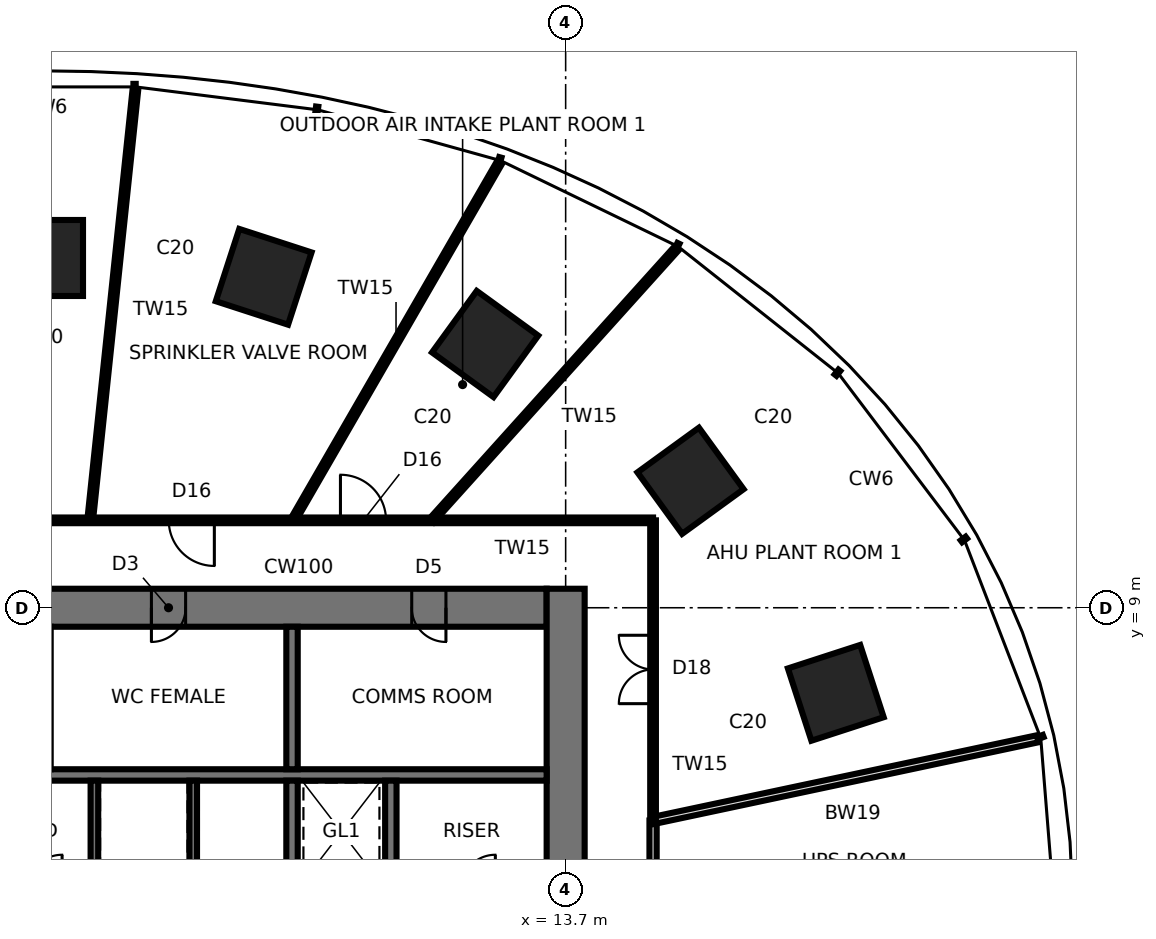
"""IFC4 building model, lengths in metres.
Left out: names, types, materials, properties, quantities, classifications, styles, units other than length and angle.
Written with IfcOpenShell. Run it as: python <this file> out.ifc"""

import sys

from ifc_helpers import new_model, si_unit, direction, frame, frame_2d, origin, origin_2d, place, context, subcontext, project, spatial, rectangle, extrude, element, fill, save


model = new_model("IFC4")
c1 = context("Model", 3, precision=1e-05, world=origin(), true_north=direction((0.0, 1.0)))
c2 = subcontext(c1, "Body", "Model", "MODEL_VIEW")
j1 = project(units=[si_unit("LENGTHUNIT", "METRE"), si_unit("PLANEANGLEUNIT", "RADIAN")], contexts=[c1])
p1 = place(None, origin())
s1 = spatial("IfcSite", under=j1, at=p1, CompositionType="ELEMENT")
p2 = place(p1, origin())
s2 = spatial("IfcBuilding", under=s1, at=p2, CompositionType="ELEMENT")
p3 = place(p2, frame((0.0, 0.0, 86.8)))
s3 = spatial("IfcBuildingStorey", under=s2, at=p3, CompositionType="ELEMENT", Elevation=86.8)
for number, where, z_axis, x_axis in (
    (1, (20.808, 6.761, 0.0), (0.0, 0.0, 1.0), (0.951, 0.309, 0.0)),
    (2, (16.986, 12.341, 0.0), (0.0, 0.0, 1.0), (0.809, 0.588, 0.0)),
    (3, (11.581, 15.94, 0.0), (0.0, 0.0, 1.0), (0.588, 0.809, 0.0)),
    (4, (5.754, 17.708, 0.0), (0.0, 0.0, 1.0), (0.309, 0.951, 0.0)),
    (5, (0.0, 18.204, 0.0), (0.0, 0.0, 1.0), (0.0, 1.0, 0.0)),
):
    element("IfcColumn", number, at=place(p3, frame(where, z_axis=z_axis, x_axis=x_axis)), inside=s3, PredefinedType="COLUMN", context=c2, shape_type="SweptSolid", body=[
        extrude(rectangle(XDim=2.0, YDim=2.0, at=origin_2d()), origin(), (0.0, 0.0, 1.0), 5.6),
    ])
p4 = place(p3, frame((13.2, 9.0, 0.0), z_axis=(0.0, 0.0, 1.0), x_axis=(-1.0, 0.0, 0.0)))
e6 = element("IfcWall", 6, at=p4, inside=s3, PredefinedType="SHEAR", context=c2, shape_type="SweptSolid", body=[
    extrude(rectangle(XDim=26.4, YDim=1.0, at=frame_2d((13.2, 0.0))), origin(), (0.0, 0.0, 1.0), 5.6),
])
p5 = place(p4, frame((2.65, 0.0, 0.0)))
e7 = element("IfcOpeningElement", 7, at=p5, cuts=e6, PredefinedType="OPENING", context=c2, shape_type="SweptSolid", body=[
    extrude(rectangle(XDim=0.9, YDim=2.1, at=frame_2d((0.45, 1.05))), frame((0.0, 0.51, 0.0), z_axis=(0.0, -1.0, 0.0), x_axis=(1.0, 0.0, 0.0)), (0.0, 0.0, 1.0), 1.02),
])
p6 = place(p4, frame((9.5, 0.0, 0.0)))
e8 = element("IfcOpeningElement", 8, at=p6, cuts=e6, PredefinedType="OPENING", context=c2, shape_type="SweptSolid", body=[
    extrude(rectangle(XDim=0.9, YDim=2.1, at=frame_2d((0.45, 1.05))), frame((0.0, 0.51, 0.0), z_axis=(0.0, -1.0, 0.0), x_axis=(1.0, 0.0, 0.0)), (0.0, 0.0, 1.0), 1.02),
])
p7 = place(p4, frame((16.0, 0.0, 0.0)))
e9 = element("IfcOpeningElement", 9, at=p7, cuts=e6, PredefinedType="OPENING", context=c2, shape_type="SweptSolid", body=[
    extrude(rectangle(XDim=0.9, YDim=2.1, at=frame_2d((0.45, 1.05))), frame((0.0, 0.51, 0.0), z_axis=(0.0, -1.0, 0.0), x_axis=(1.0, 0.0, 0.0)), (0.0, 0.0, 1.0), 1.02),
])
p8 = place(p4, frame((21.25, 0.0, 0.0)))
e10 = element("IfcOpeningElement", 10, at=p8, cuts=e6, PredefinedType="OPENING", context=c2, shape_type="SweptSolid", body=[
    extrude(rectangle(XDim=0.9, YDim=2.1, at=frame_2d((0.45, 1.05))), frame((0.0, 0.51, 0.0), z_axis=(0.0, -1.0, 0.0), x_axis=(1.0, 0.0, 0.0)), (0.0, 0.0, 1.0), 1.02),
])
p9 = place(p4, frame((24.8, 0.0, 0.0)))
e11 = element("IfcOpeningElement", 11, at=p9, cuts=e6, PredefinedType="OPENING", context=c2, shape_type="SweptSolid", body=[
    extrude(rectangle(XDim=1.0, YDim=2.1, at=frame_2d((0.5, 1.05))), frame((0.0, 0.51, 0.0), z_axis=(0.0, -1.0, 0.0), x_axis=(1.0, 0.0, 0.0)), (0.0, 0.0, 1.0), 1.02),
])
p10 = place(p3, frame((13.7, -9.5, 0.0), z_axis=(0.0, 0.0, 1.0), x_axis=(0.0, 1.0, 0.0)))
e12 = element("IfcWall", 12, at=p10, inside=s3, PredefinedType="SHEAR", context=c2, shape_type="SweptSolid", body=[
    extrude(rectangle(XDim=19.0, YDim=1.0, at=frame_2d((9.5, 0.0))), origin(), (0.0, 0.0, 1.0), 5.6),
])
p11 = place(p10, frame((8.6, 0.0, 0.0)))
e13 = element("IfcOpeningElement", 13, at=p11, cuts=e12, PredefinedType="OPENING", context=c2, shape_type="SweptSolid", body=[
    extrude(rectangle(XDim=1.8, YDim=2.4, at=frame_2d((0.9, 1.2))), frame((0.0, 0.51, 0.0), z_axis=(0.0, -1.0, 0.0), x_axis=(1.0, 0.0, 0.0)), (0.0, 0.0, 1.0), 1.02),
])
p12 = place(p3, frame((-13.2, 4.6, 0.0), z_axis=(0.0, 0.0, 1.0), x_axis=(1.0, 0.0, 0.0)))
e14 = element("IfcWall", 14, at=p12, inside=s3, PredefinedType="SHEAR", context=c2, shape_type="SweptSolid", body=[
    extrude(rectangle(XDim=26.4, YDim=0.3, at=frame_2d((13.2, 0.0))), origin(), (0.0, 0.0, 1.0), 5.6),
])
p13 = place(p3, frame((6.5, 1.75, 0.0), z_axis=(0.0, 0.0, 1.0), x_axis=(0.0, 1.0, 0.0)))
e15 = element("IfcWall", 15, at=p13, inside=s3, PredefinedType="SHEAR", context=c2, shape_type="SweptSolid", body=[
    extrude(rectangle(XDim=2.7, YDim=0.3, at=frame_2d((1.35, 0.0))), origin(), (0.0, 0.0, 1.0), 5.6),
])
p14 = place(p3, frame((6.5, 4.75, 0.0), z_axis=(0.0, 0.0, 1.0), x_axis=(0.0, 1.0, 0.0)))
e16 = element("IfcWall", 16, at=p14, inside=s3, PredefinedType="SHEAR", context=c2, shape_type="SweptSolid", body=[
    extrude(rectangle(XDim=3.75, YDim=0.3, at=frame_2d((1.875, 0.0))), origin(), (0.0, 0.0, 1.0), 5.6),
])
for number, where, z_axis, x_axis in (
    (17, (1.3, 1.75, 0.0), (0.0, 0.0, 1.0), (0.0, 1.0, 0.0)),
    (18, (3.9, 1.75, 0.0), (0.0, 0.0, 1.0), (0.0, 1.0, 0.0)),
):
    element("IfcWall", number, at=place(p3, frame(where, z_axis=z_axis, x_axis=x_axis)), inside=s3, PredefinedType="SHEAR", context=c2, shape_type="SweptSolid", body=[
        extrude(rectangle(XDim=2.7, YDim=0.2, at=frame_2d((1.35, 0.0))), origin(), (0.0, 0.0, 1.0), 5.6),
    ])
p15 = place(p3, frame((9.1, 1.75, 0.0), z_axis=(0.0, 0.0, 1.0), x_axis=(0.0, 1.0, 0.0)))
e19 = element("IfcWall", 19, at=p15, inside=s3, PredefinedType="SHEAR", context=c2, shape_type="SweptSolid", body=[
    extrude(rectangle(XDim=2.7, YDim=0.3, at=frame_2d((1.35, 0.0))), origin(), (0.0, 0.0, 1.0), 5.6),
])
p16 = place(p3, frame((16.0, -3.401, 0.0), z_axis=(0.0, 0.0, 1.0), x_axis=(0.0, 1.0, 0.0)))
e20 = element("IfcWall", 20, at=p16, inside=s3, PredefinedType="SOLIDWALL", context=c2, shape_type="SweptSolid", body=[
    extrude(rectangle(XDim=6.802, YDim=0.19, at=frame_2d((3.401, 0.0))), origin(), (0.0, 0.0, 1.0), 5.4),
])
p17 = place(p16, frame((2.801, 0.0, 0.0)))
e21 = element("IfcOpeningElement", 21, at=p17, cuts=e20, PredefinedType="OPENING", context=c2, shape_type="SweptSolid", body=[
    extrude(rectangle(XDim=1.2, YDim=2.1, at=frame_2d((0.6, 1.05))), frame((0.0, 0.105, 0.0), z_axis=(0.0, -1.0, 0.0), x_axis=(1.0, 0.0, 0.0)), (0.0, 0.0, 1.0), 0.21),
])
p18 = place(p3, frame((26.123, 5.553, 0.0), z_axis=(0.0, 0.0, 1.0), x_axis=(-0.978145959178, -0.207919413582, 0.0)))
e22 = element("IfcWall", 22, at=p18, inside=s3, PredefinedType="SOLIDWALL", context=c2, shape_type="SweptSolid", body=[
    extrude(rectangle(XDim=10.349, YDim=0.19, at=frame_2d((5.175, 0.0))), origin(), (0.0, 0.0, 1.0), 5.4),
])
p19 = place(p3, frame((16.0, 3.401, 0.0), z_axis=(0.0, 0.0, 1.0), x_axis=(0.0, 1.0, 0.0)))
e23 = element("IfcWall", 23, at=p19, inside=s3, PredefinedType="PARTITIONING", context=c2, shape_type="SweptSolid", body=[
    extrude(rectangle(XDim=7.899, YDim=0.15, at=frame_2d((3.95, 0.0))), origin(), (0.0, 0.0, 1.0), 5.4),
])
p20 = place(p19, frame((3.075, 0.0, 0.0)))
e24 = element("IfcOpeningElement", 24, at=p20, cuts=e23, PredefinedType="OPENING", context=c2, shape_type="SweptSolid", body=[
    extrude(rectangle(XDim=1.8, YDim=2.4, at=frame_2d((0.9, 1.2))), frame((0.0, 0.085, 0.0), z_axis=(0.0, -1.0, 0.0), x_axis=(1.0, 0.0, 0.0)), (0.0, 0.0, 1.0), 0.17),
])
p21 = place(p3, frame((10.175, 11.3, 0.0), z_axis=(0.0, 0.0, 1.0), x_axis=(0.669134495154, 0.743141323972, 0.0)))
e25 = element("IfcWall", 25, at=p21, inside=s3, PredefinedType="PARTITIONING", context=c2, shape_type="SweptSolid", body=[
    extrude(rectangle(XDim=9.613, YDim=0.15, at=frame_2d((4.807, 0.0))), origin(), (0.0, 0.0, 1.0), 5.4),
])
p22 = place(p3, frame((6.524, 11.3, 0.0), z_axis=(0.0, 0.0, 1.0), x_axis=(0.499989292232, 0.866031585829, 0.0)))
e26 = element("IfcWall", 26, at=p22, inside=s3, PredefinedType="PARTITIONING", context=c2, shape_type="SweptSolid", body=[
    extrude(rectangle(XDim=10.85, YDim=0.15, at=frame_2d((5.425, 0.0))), origin(), (0.0, 0.0, 1.0), 5.4),
])
p23 = place(p3, frame((1.188, 11.3, 0.0), z_axis=(0.0, 0.0, 1.0), x_axis=(0.10452632632, 0.994522119968, 0.0)))
e27 = element("IfcWall", 27, at=p23, inside=s3, PredefinedType="PARTITIONING", context=c2, shape_type="SweptSolid", body=[
    extrude(rectangle(XDim=11.389, YDim=0.15, at=frame_2d((5.694, 0.0))), origin(), (0.0, 0.0, 1.0), 5.4),
])
p24 = place(p3, frame((16.0, 11.3, 0.0), z_axis=(0.0, 0.0, 1.0), x_axis=(-1.0, 0.0, 0.0)))
e28 = element("IfcWall", 28, at=p24, inside=s3, PredefinedType="PARTITIONING", context=c2, shape_type="SweptSolid", body=[
    extrude(rectangle(XDim=32.0, YDim=0.15, at=frame_2d((16.0, 0.0))), origin(), (0.0, 0.0, 1.0), 5.4),
])
p25 = place(p24, frame((7.026, 0.0, 0.0)))
e29 = element("IfcOpeningElement", 29, at=p25, cuts=e28, PredefinedType="OPENING", context=c2, shape_type="SweptSolid", body=[
    extrude(rectangle(XDim=1.2, YDim=2.1, at=frame_2d((0.6, 1.05))), frame((0.0, 0.085, 0.0), z_axis=(0.0, -1.0, 0.0), x_axis=(1.0, 0.0, 0.0)), (0.0, 0.0, 1.0), 0.17),
])
p26 = place(p24, frame((11.544, 0.0, 0.0)))
e30 = element("IfcOpeningElement", 30, at=p26, cuts=e28, PredefinedType="OPENING", context=c2, shape_type="SweptSolid", body=[
    extrude(rectangle(XDim=1.2, YDim=2.1, at=frame_2d((0.6, 1.05))), frame((0.0, 0.085, 0.0), z_axis=(0.0, -1.0, 0.0), x_axis=(1.0, 0.0, 0.0)), (0.0, 0.0, 1.0), 0.17),
])
p27 = place(p24, frame((19.618, 0.0, 0.0)))
e31 = element("IfcOpeningElement", 31, at=p27, cuts=e28, PredefinedType="OPENING", context=c2, shape_type="SweptSolid", body=[
    extrude(rectangle(XDim=1.8, YDim=2.4, at=frame_2d((0.9, 1.2))), frame((0.0, 0.085, 0.0), z_axis=(0.0, -1.0, 0.0), x_axis=(1.0, 0.0, 0.0)), (0.0, 0.0, 1.0), 0.17),
])
p28 = place(p24, frame((28.487, 0.0, 0.0)))
e32 = element("IfcOpeningElement", 32, at=p28, cuts=e28, PredefinedType="OPENING", context=c2, shape_type="SweptSolid", body=[
    extrude(rectangle(XDim=1.2, YDim=2.1, at=frame_2d((0.6, 1.05))), frame((0.0, 0.085, 0.0), z_axis=(0.0, -1.0, 0.0), x_axis=(1.0, 0.0, 0.0)), (0.0, 0.0, 1.0), 0.17),
])
p29 = place(p5, origin())
e33 = element("IfcDoor", 33, at=p29, inside=s3, OperationType="SINGLE_SWING_LEFT", PredefinedType="DOOR", context=c2, shape_type="SweptSolid", body=[
    extrude(rectangle(XDim=0.82, YDim=2.06, at=frame_2d((0.45, 1.03))), frame((0.0, 0.025, 0.0), z_axis=(0.0, -1.0, 0.0), x_axis=(1.0, 0.0, 0.0)), (0.0, 0.0, 1.0), 0.05),
    extrude(rectangle(XDim=0.04, YDim=2.1, at=frame_2d((0.02, 1.05))), frame((0.0, 0.25, 0.0), z_axis=(0.0, -1.0, 0.0), x_axis=(1.0, 0.0, 0.0)), (0.0, 0.0, 1.0), 0.5),
    extrude(rectangle(XDim=0.04, YDim=2.1, at=frame_2d((0.88, 1.05))), frame((0.0, 0.25, 0.0), z_axis=(0.0, -1.0, 0.0), x_axis=(1.0, 0.0, 0.0)), (0.0, 0.0, 1.0), 0.5),
    extrude(rectangle(XDim=0.82, YDim=0.04, at=frame_2d((0.45, 2.08))), frame((0.0, 0.25, 0.0), z_axis=(0.0, -1.0, 0.0), x_axis=(1.0, 0.0, 0.0)), (0.0, 0.0, 1.0), 0.5),
])
fill(e7, e33)
p30 = place(p6, origin())
e34 = element("IfcDoor", 34, at=p30, inside=s3, OperationType="SINGLE_SWING_RIGHT", PredefinedType="DOOR", context=c2, shape_type="SweptSolid", body=[
    extrude(rectangle(XDim=0.82, YDim=2.06, at=frame_2d((0.45, 1.03))), frame((0.0, 0.025, 0.0), z_axis=(0.0, -1.0, 0.0), x_axis=(1.0, 0.0, 0.0)), (0.0, 0.0, 1.0), 0.05),
    extrude(rectangle(XDim=0.04, YDim=2.1, at=frame_2d((0.02, 1.05))), frame((0.0, 0.25, 0.0), z_axis=(0.0, -1.0, 0.0), x_axis=(1.0, 0.0, 0.0)), (0.0, 0.0, 1.0), 0.5),
    extrude(rectangle(XDim=0.04, YDim=2.1, at=frame_2d((0.88, 1.05))), frame((0.0, 0.25, 0.0), z_axis=(0.0, -1.0, 0.0), x_axis=(1.0, 0.0, 0.0)), (0.0, 0.0, 1.0), 0.5),
    extrude(rectangle(XDim=0.82, YDim=0.04, at=frame_2d((0.45, 2.08))), frame((0.0, 0.25, 0.0), z_axis=(0.0, -1.0, 0.0), x_axis=(1.0, 0.0, 0.0)), (0.0, 0.0, 1.0), 0.5),
])
fill(e8, e34)
p31 = place(p20, origin())
e35 = element("IfcDoor", 35, at=p31, inside=s3, OperationType="DOUBLE_DOOR_SINGLE_SWING", PredefinedType="DOOR", context=c2, shape_type="SweptSolid", body=[
    extrude(rectangle(XDim=1.8, YDim=2.4, at=frame_2d((0.9, 1.2))), frame((0.0, 0.025, 0.0), z_axis=(0.0, -1.0, 0.0), x_axis=(1.0, 0.0, 0.0)), (0.0, 0.0, 1.0), 0.05),
])
fill(e24, e35)
p32 = place(p25, frame((1.2, 0.0, 0.0), z_axis=(0.0, 0.0, 1.0), x_axis=(-1.0, 0.0, 0.0)))
e36 = element("IfcDoor", 36, at=p32, inside=s3, OperationType="SINGLE_SWING_LEFT", PredefinedType="DOOR", context=c2, shape_type="SweptSolid", body=[
    extrude(rectangle(XDim=1.2, YDim=2.1, at=frame_2d((0.6, 1.05))), frame((0.0, 0.025, 0.0), z_axis=(0.0, -1.0, 0.0), x_axis=(1.0, 0.0, 0.0)), (0.0, 0.0, 1.0), 0.05),
])
fill(e29, e36)
p33 = place(p26, origin())
e37 = element("IfcDoor", 37, at=p33, inside=s3, OperationType="SINGLE_SWING_LEFT", PredefinedType="DOOR", context=c2, shape_type="SweptSolid", body=[
    extrude(rectangle(XDim=1.2, YDim=2.1, at=frame_2d((0.6, 1.05))), frame((0.0, 0.025, 0.0), z_axis=(0.0, -1.0, 0.0), x_axis=(1.0, 0.0, 0.0)), (0.0, 0.0, 1.0), 0.05),
])
fill(e30, e37)
save(model, sys.argv[1])
